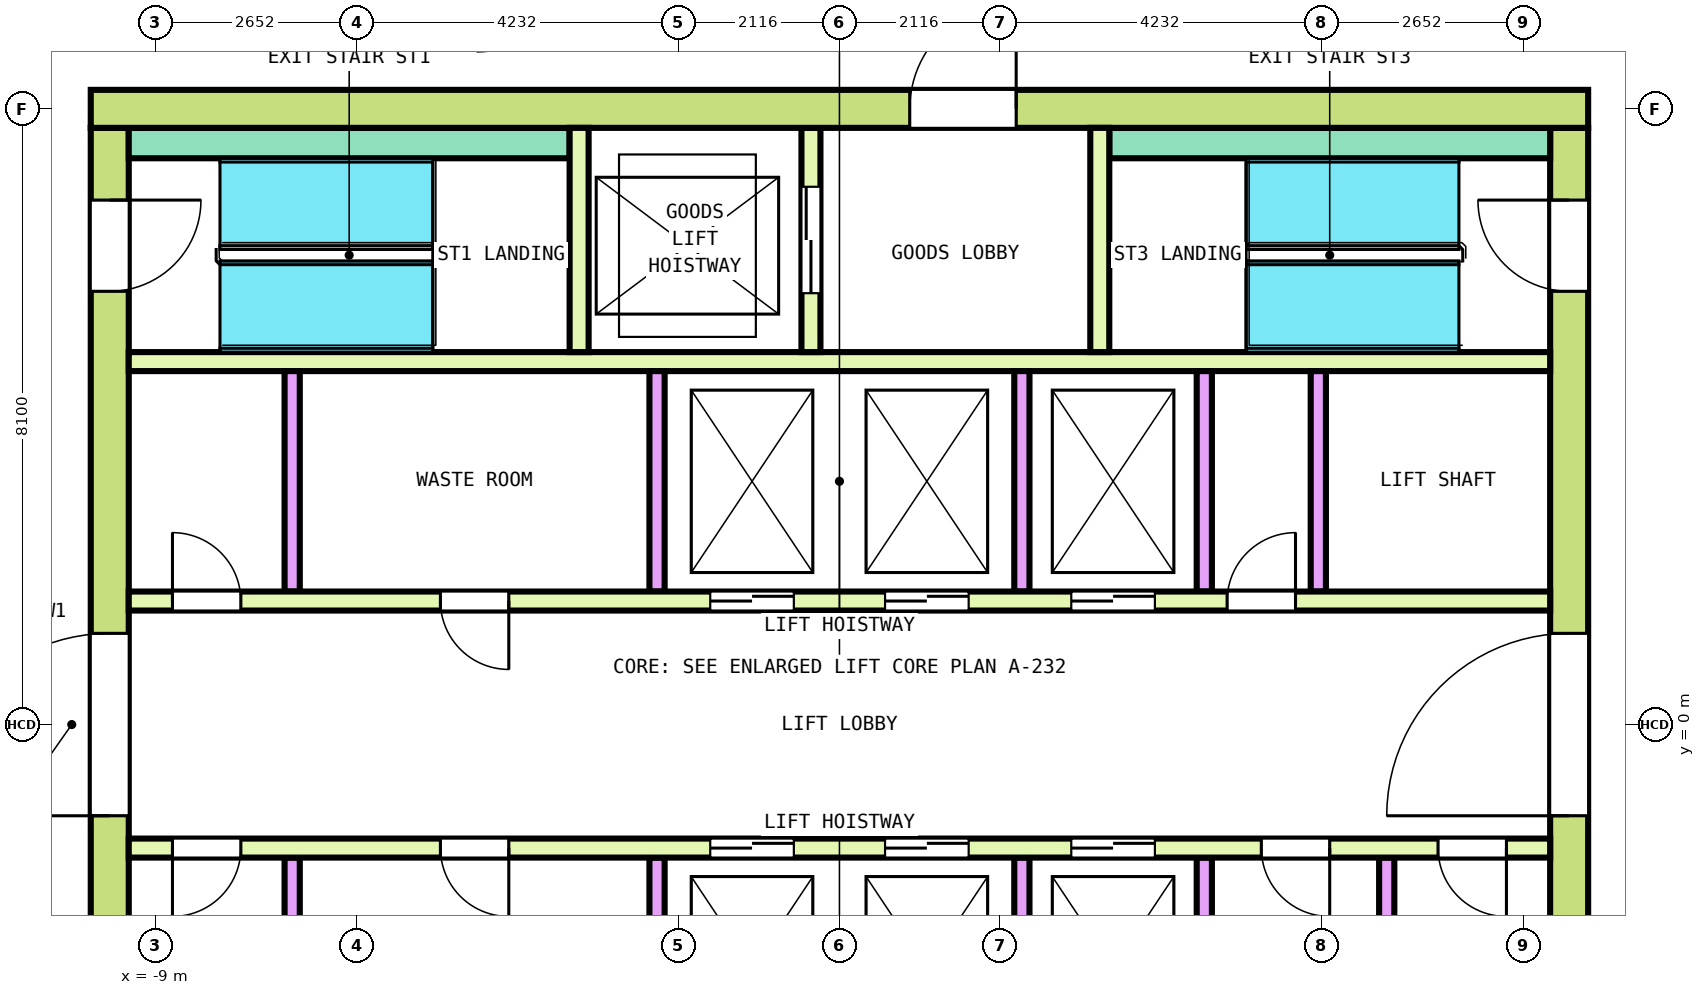
"""IFC4 building model, lengths in metres.
Left out: names, types, materials, properties, quantities, classifications, styles, units other than length and angle.
Written with IfcOpenShell. Run it as: python <this file> out.ifc"""

import sys

from ifc_helpers import new_model, si_unit, direction, frame, frame_2d, origin, place, context, subcontext, project, spatial, rectangle, extrude, element, fill, save


model = new_model("IFC4")
c1 = context("Model", 3, precision=1e-05, world=origin(), true_north=direction((0.0, 1.0)))
c2 = subcontext(c1, "Body", "Model", "MODEL_VIEW")
j1 = project(units=[si_unit("LENGTHUNIT", "METRE"), si_unit("PLANEANGLEUNIT", "RADIAN")], contexts=[c1])
p1 = place(None, origin())
s1 = spatial("IfcSite", under=j1, at=p1, CompositionType="ELEMENT")
p2 = place(p1, origin())
s2 = spatial("IfcBuilding", under=s1, at=p2, CompositionType="ELEMENT")
p3 = place(p2, frame((0.0, 0.0, 336.6)))
s3 = spatial("IfcBuildingStorey", under=s2, at=p3, CompositionType="ELEMENT", Elevation=336.6)
p4 = place(p3, frame((-9.85, 8.1, 0.0), z_axis=(0.0, 0.0, 1.0), x_axis=(1.0, 0.0, 0.0)))
e1 = element("IfcWall", 1, at=p4, inside=s3, PredefinedType="SHEAR", context=c2, shape_type="SweptSolid", body=[
    extrude(rectangle(XDim=19.7, YDim=0.5, at=frame_2d((9.85, 0.0))), origin(), (0.0, 0.0, 1.0), 3.7),
])
p5 = place(p4, frame((10.775, 0.0, 0.0)))
e2 = element("IfcOpeningElement", 2, at=p5, cuts=e1, PredefinedType="OPENING", context=c2, shape_type="SweptSolid", body=[
    extrude(rectangle(XDim=1.4, YDim=2.1, at=frame_2d((0.7, 1.05))), frame((0.0, 0.26, 0.0), z_axis=(0.0, -1.0, 0.0), x_axis=(1.0, 0.0, 0.0)), (0.0, 0.0, 1.0), 0.52),
])
p6 = place(p3, frame((-9.6, -7.85, 0.0), z_axis=(0.0, 0.0, 1.0), x_axis=(0.0, 1.0, 0.0)))
e3 = element("IfcWall", 3, at=p6, inside=s3, PredefinedType="SHEAR", context=c2, shape_type="SweptSolid", body=[
    extrude(rectangle(XDim=15.7, YDim=0.5, at=frame_2d((7.85, 0.0))), origin(), (0.0, 0.0, 1.0), 3.7),
])
p7 = place(p6, frame((6.65, 0.0, 0.0)))
e4 = element("IfcOpeningElement", 4, at=p7, cuts=e3, PredefinedType="OPENING", context=c2, shape_type="SweptSolid", body=[
    extrude(rectangle(XDim=2.4, YDim=2.1, at=frame_2d((1.2, 1.05))), frame((0.0, 0.26, 0.0), z_axis=(0.0, -1.0, 0.0), x_axis=(1.0, 0.0, 0.0)), (0.0, 0.0, 1.0), 0.52),
])
p8 = place(p6, frame((13.55, 0.0, 0.0)))
e5 = element("IfcOpeningElement", 5, at=p8, cuts=e3, PredefinedType="OPENING", context=c2, shape_type="SweptSolid", body=[
    extrude(rectangle(XDim=1.2, YDim=2.1, at=frame_2d((0.6, 1.05))), frame((0.0, 0.26, 0.0), z_axis=(0.0, -1.0, 0.0), x_axis=(1.0, 0.0, 0.0)), (0.0, 0.0, 1.0), 0.52),
])
p9 = place(p6, frame((0.95, 0.0, 0.0)))
e6 = element("IfcOpeningElement", 6, at=p9, cuts=e3, PredefinedType="OPENING", context=c2, shape_type="SweptSolid", body=[
    extrude(rectangle(XDim=1.2, YDim=2.1, at=frame_2d((0.6, 1.05))), frame((0.0, 0.26, 0.0), z_axis=(0.0, -1.0, 0.0), x_axis=(1.0, 0.0, 0.0)), (0.0, 0.0, 1.0), 0.52),
])
p10 = place(p3, frame((9.6, -7.85, 0.0), z_axis=(0.0, 0.0, 1.0), x_axis=(0.0, 1.0, 0.0)))
e7 = element("IfcWall", 7, at=p10, inside=s3, PredefinedType="SHEAR", context=c2, shape_type="SweptSolid", body=[
    extrude(rectangle(XDim=15.7, YDim=0.5, at=frame_2d((7.85, 0.0))), origin(), (0.0, 0.0, 1.0), 3.7),
])
p11 = place(p10, frame((6.65, 0.0, 0.0)))
e8 = element("IfcOpeningElement", 8, at=p11, cuts=e7, PredefinedType="OPENING", context=c2, shape_type="SweptSolid", body=[
    extrude(rectangle(XDim=2.4, YDim=2.1, at=frame_2d((1.2, 1.05))), frame((0.0, 0.26, 0.0), z_axis=(0.0, -1.0, 0.0), x_axis=(1.0, 0.0, 0.0)), (0.0, 0.0, 1.0), 0.52),
])
p12 = place(p10, frame((13.55, 0.0, 0.0)))
e9 = element("IfcOpeningElement", 9, at=p12, cuts=e7, PredefinedType="OPENING", context=c2, shape_type="SweptSolid", body=[
    extrude(rectangle(XDim=1.2, YDim=2.1, at=frame_2d((0.6, 1.05))), frame((0.0, 0.26, 0.0), z_axis=(0.0, -1.0, 0.0), x_axis=(1.0, 0.0, 0.0)), (0.0, 0.0, 1.0), 0.52),
])
p13 = place(p10, frame((1.05, 0.0, 0.0)))
e10 = element("IfcOpeningElement", 10, at=p13, cuts=e7, PredefinedType="OPENING", context=c2, shape_type="SweptSolid", body=[
    extrude(rectangle(XDim=1.0, YDim=2.1, at=frame_2d((0.5, 1.05))), frame((0.0, 0.26, 0.0), z_axis=(0.0, -1.0, 0.0), x_axis=(1.0, 0.0, 0.0)), (0.0, 0.0, 1.0), 0.52),
])
p14 = place(p3, frame((-9.35, 1.625, 0.0), z_axis=(0.0, 0.0, 1.0), x_axis=(1.0, 0.0, 0.0)))
e11 = element("IfcWall", 11, at=p14, inside=s3, PredefinedType="SOLIDWALL", context=c2, shape_type="SweptSolid", body=[
    extrude(rectangle(XDim=18.7, YDim=0.25, at=frame_2d((9.35, 0.0))), origin(), (0.0, 0.0, 1.0), 3.7),
])
p15 = place(p14, frame((7.65, 0.0, 0.0)))
e12 = element("IfcOpeningElement", 12, at=p15, cuts=e11, PredefinedType="OPENING", context=c2, shape_type="SweptSolid", body=[
    extrude(rectangle(XDim=1.1, YDim=2.1, at=frame_2d((0.55, 1.05))), frame((0.0, 0.135, 0.0), z_axis=(0.0, -1.0, 0.0), x_axis=(1.0, 0.0, 0.0)), (0.0, 0.0, 1.0), 0.27),
])
p16 = place(p14, frame((9.95, 0.0, 0.0)))
e13 = element("IfcOpeningElement", 13, at=p16, cuts=e11, PredefinedType="OPENING", context=c2, shape_type="SweptSolid", body=[
    extrude(rectangle(XDim=1.1, YDim=2.1, at=frame_2d((0.55, 1.05))), frame((0.0, 0.135, 0.0), z_axis=(0.0, -1.0, 0.0), x_axis=(1.0, 0.0, 0.0)), (0.0, 0.0, 1.0), 0.27),
])
p17 = place(p14, frame((12.4, 0.0, 0.0)))
e14 = element("IfcOpeningElement", 14, at=p17, cuts=e11, PredefinedType="OPENING", context=c2, shape_type="SweptSolid", body=[
    extrude(rectangle(XDim=1.1, YDim=2.1, at=frame_2d((0.55, 1.05))), frame((0.0, 0.135, 0.0), z_axis=(0.0, -1.0, 0.0), x_axis=(1.0, 0.0, 0.0)), (0.0, 0.0, 1.0), 0.27),
])
p18 = place(p14, frame((0.575, 0.0, 0.0)))
e15 = element("IfcOpeningElement", 15, at=p18, cuts=e11, PredefinedType="OPENING", context=c2, shape_type="SweptSolid", body=[
    extrude(rectangle(XDim=0.9, YDim=2.1, at=frame_2d((0.45, 1.05))), frame((0.0, 0.135, 0.0), z_axis=(0.0, -1.0, 0.0), x_axis=(1.0, 0.0, 0.0)), (0.0, 0.0, 1.0), 0.27),
])
p19 = place(p14, frame((4.1, 0.0, 0.0)))
e16 = element("IfcOpeningElement", 16, at=p19, cuts=e11, PredefinedType="OPENING", context=c2, shape_type="SweptSolid", body=[
    extrude(rectangle(XDim=0.9, YDim=2.1, at=frame_2d((0.45, 1.05))), frame((0.0, 0.135, 0.0), z_axis=(0.0, -1.0, 0.0), x_axis=(1.0, 0.0, 0.0)), (0.0, 0.0, 1.0), 0.27),
])
p20 = place(p14, frame((14.45, 0.0, 0.0)))
e17 = element("IfcOpeningElement", 17, at=p20, cuts=e11, PredefinedType="OPENING", context=c2, shape_type="SweptSolid", body=[
    extrude(rectangle(XDim=0.9, YDim=2.1, at=frame_2d((0.45, 1.05))), frame((0.0, 0.135, 0.0), z_axis=(0.0, -1.0, 0.0), x_axis=(1.0, 0.0, 0.0)), (0.0, 0.0, 1.0), 0.27),
])
p21 = place(p3, frame((-9.35, 4.775, 0.0), z_axis=(0.0, 0.0, 1.0), x_axis=(1.0, 0.0, 0.0)))
e18 = element("IfcWall", 18, at=p21, inside=s3, PredefinedType="SOLIDWALL", context=c2, shape_type="SweptSolid", body=[
    extrude(rectangle(XDim=18.7, YDim=0.25, at=frame_2d((9.35, 0.0))), origin(), (0.0, 0.0, 1.0), 3.7),
])
for number, where, z_axis, x_axis in (
    (19, (-7.2, 1.75, 0.0), (0.0, 0.0, 1.0), (0.0, 1.0, 0.0)),
    (20, (-2.4, 1.75, 0.0), (0.0, 0.0, 1.0), (0.0, 1.0, 0.0)),
    (21, (2.4, 1.75, 0.0), (0.0, 0.0, 1.0), (0.0, 1.0, 0.0)),
    (22, (4.8, 1.75, 0.0), (0.0, 0.0, 1.0), (0.0, 1.0, 0.0)),
    (23, (6.3, 1.75, 0.0), (0.0, 0.0, 1.0), (0.0, 1.0, 0.0)),
):
    element("IfcWall", number, at=place(p3, frame(where, z_axis=z_axis, x_axis=x_axis)), inside=s3, PredefinedType="SOLIDWALL", context=c2, shape_type="SweptSolid", body=[
        extrude(rectangle(XDim=2.9, YDim=0.2, at=frame_2d((1.45, 0.0))), origin(), (0.0, 0.0, 1.0), 3.7),
    ])
p22 = place(p3, frame((-9.35, -1.625, 0.0), z_axis=(0.0, 0.0, 1.0), x_axis=(1.0, 0.0, 0.0)))
e24 = element("IfcWall", 24, at=p22, inside=s3, PredefinedType="SOLIDWALL", context=c2, shape_type="SweptSolid", body=[
    extrude(rectangle(XDim=18.7, YDim=0.25, at=frame_2d((9.35, 0.0))), origin(), (0.0, 0.0, 1.0), 3.7),
])
p23 = place(p22, frame((7.65, 0.0, 0.0)))
e25 = element("IfcOpeningElement", 25, at=p23, cuts=e24, PredefinedType="OPENING", context=c2, shape_type="SweptSolid", body=[
    extrude(rectangle(XDim=1.1, YDim=2.1, at=frame_2d((0.55, 1.05))), frame((0.0, 0.135, 0.0), z_axis=(0.0, -1.0, 0.0), x_axis=(1.0, 0.0, 0.0)), (0.0, 0.0, 1.0), 0.27),
])
p24 = place(p22, frame((9.95, 0.0, 0.0)))
e26 = element("IfcOpeningElement", 26, at=p24, cuts=e24, PredefinedType="OPENING", context=c2, shape_type="SweptSolid", body=[
    extrude(rectangle(XDim=1.1, YDim=2.1, at=frame_2d((0.55, 1.05))), frame((0.0, 0.135, 0.0), z_axis=(0.0, -1.0, 0.0), x_axis=(1.0, 0.0, 0.0)), (0.0, 0.0, 1.0), 0.27),
])
p25 = place(p22, frame((12.4, 0.0, 0.0)))
e27 = element("IfcOpeningElement", 27, at=p25, cuts=e24, PredefinedType="OPENING", context=c2, shape_type="SweptSolid", body=[
    extrude(rectangle(XDim=1.1, YDim=2.1, at=frame_2d((0.55, 1.05))), frame((0.0, 0.135, 0.0), z_axis=(0.0, -1.0, 0.0), x_axis=(1.0, 0.0, 0.0)), (0.0, 0.0, 1.0), 0.27),
])
p26 = place(p22, frame((0.575, 0.0, 0.0)))
e28 = element("IfcOpeningElement", 28, at=p26, cuts=e24, PredefinedType="OPENING", context=c2, shape_type="SweptSolid", body=[
    extrude(rectangle(XDim=0.9, YDim=2.1, at=frame_2d((0.45, 1.05))), frame((0.0, 0.135, 0.0), z_axis=(0.0, -1.0, 0.0), x_axis=(1.0, 0.0, 0.0)), (0.0, 0.0, 1.0), 0.27),
])
p27 = place(p22, frame((4.1, 0.0, 0.0)))
e29 = element("IfcOpeningElement", 29, at=p27, cuts=e24, PredefinedType="OPENING", context=c2, shape_type="SweptSolid", body=[
    extrude(rectangle(XDim=0.9, YDim=2.1, at=frame_2d((0.45, 1.05))), frame((0.0, 0.135, 0.0), z_axis=(0.0, -1.0, 0.0), x_axis=(1.0, 0.0, 0.0)), (0.0, 0.0, 1.0), 0.27),
])
p28 = place(p22, frame((14.9, 0.0, 0.0)))
e30 = element("IfcOpeningElement", 30, at=p28, cuts=e24, PredefinedType="OPENING", context=c2, shape_type="SweptSolid", body=[
    extrude(rectangle(XDim=0.9, YDim=2.1, at=frame_2d((0.45, 1.05))), frame((0.0, 0.135, 0.0), z_axis=(0.0, -1.0, 0.0), x_axis=(1.0, 0.0, 0.0)), (0.0, 0.0, 1.0), 0.27),
])
p29 = place(p22, frame((17.225, 0.0, 0.0)))
e31 = element("IfcOpeningElement", 31, at=p29, cuts=e24, PredefinedType="OPENING", context=c2, shape_type="SweptSolid", body=[
    extrude(rectangle(XDim=0.9, YDim=2.1, at=frame_2d((0.45, 1.05))), frame((0.0, 0.135, 0.0), z_axis=(0.0, -1.0, 0.0), x_axis=(1.0, 0.0, 0.0)), (0.0, 0.0, 1.0), 0.27),
])
for number, where, z_axis, x_axis in (
    (32, (-7.2, -4.65, 0.0), (0.0, 0.0, 1.0), (0.0, 1.0, 0.0)),
    (33, (-2.4, -4.65, 0.0), (0.0, 0.0, 1.0), (0.0, 1.0, 0.0)),
    (34, (2.4, -4.65, 0.0), (0.0, 0.0, 1.0), (0.0, 1.0, 0.0)),
    (35, (4.8, -4.65, 0.0), (0.0, 0.0, 1.0), (0.0, 1.0, 0.0)),
    (36, (7.2, -4.65, 0.0), (0.0, 0.0, 1.0), (0.0, 1.0, 0.0)),
):
    element("IfcWall", number, at=place(p3, frame(where, z_axis=z_axis, x_axis=x_axis)), inside=s3, PredefinedType="SOLIDWALL", context=c2, shape_type="SweptSolid", body=[
        extrude(rectangle(XDim=2.9, YDim=0.2, at=frame_2d((1.45, 0.0))), origin(), (0.0, 0.0, 1.0), 3.7),
    ])
for number, where, z_axis, x_axis in (
    (37, (-9.35, 7.65, 0.0), (0.0, 0.0, 1.0), (1.0, 0.0, 0.0)),
    (38, (3.55, 7.65, 0.0), (0.0, 0.0, 1.0), (1.0, 0.0, 0.0)),
):
    element("IfcWall", number, at=place(p3, frame(where, z_axis=z_axis, x_axis=x_axis)), inside=s3, PredefinedType="SOLIDWALL", context=c2, shape_type="SweptSolid", body=[
        extrude(rectangle(XDim=5.8, YDim=0.4, at=frame_2d((2.9, 0.0))), origin(), (0.0, 0.0, 1.0), 3.7),
    ])
p30 = place(p3, frame((-3.425, 4.9, 0.0), z_axis=(0.0, 0.0, 1.0), x_axis=(0.0, 1.0, 0.0)))
e39 = element("IfcWall", 39, at=p30, inside=s3, PredefinedType="SOLIDWALL", context=c2, shape_type="SweptSolid", body=[
    extrude(rectangle(XDim=2.95, YDim=0.25, at=frame_2d((1.475, 0.0))), origin(), (0.0, 0.0, 1.0), 3.7),
])
p31 = place(p3, frame((-0.375, 4.9, 0.0), z_axis=(0.0, 0.0, 1.0), x_axis=(0.0, 1.0, 0.0)))
e40 = element("IfcWall", 40, at=p31, inside=s3, PredefinedType="SOLIDWALL", context=c2, shape_type="SweptSolid", body=[
    extrude(rectangle(XDim=2.95, YDim=0.25, at=frame_2d((1.475, 0.0))), origin(), (0.0, 0.0, 1.0), 3.7),
])
p32 = place(p31, frame((0.775, 0.0, 0.0)))
e41 = element("IfcOpeningElement", 41, at=p32, cuts=e40, PredefinedType="OPENING", context=c2, shape_type="SweptSolid", body=[
    extrude(rectangle(XDim=1.4, YDim=2.1, at=frame_2d((0.7, 1.05))), frame((0.0, 0.135, 0.0), z_axis=(0.0, -1.0, 0.0), x_axis=(1.0, 0.0, 0.0)), (0.0, 0.0, 1.0), 0.27),
])
p33 = place(p3, frame((3.425, 4.9, 0.0), z_axis=(0.0, 0.0, 1.0), x_axis=(0.0, 1.0, 0.0)))
e42 = element("IfcWall", 42, at=p33, inside=s3, PredefinedType="SOLIDWALL", context=c2, shape_type="SweptSolid", body=[
    extrude(rectangle(XDim=2.95, YDim=0.25, at=frame_2d((1.475, 0.0))), origin(), (0.0, 0.0, 1.0), 3.7),
])
p34 = place(p15, origin())
e43 = element("IfcDoor", 43, at=p34, inside=s3, OperationType="DOUBLE_DOOR_SLIDING", PredefinedType="DOOR", context=c2, shape_type="SweptSolid", body=[
    extrude(rectangle(XDim=1.1, YDim=2.1, at=frame_2d((0.55, 1.05))), frame((0.0, 0.075, 0.0), z_axis=(0.0, -1.0, 0.0), x_axis=(1.0, 0.0, 0.0)), (0.0, 0.0, 1.0), 0.15),
])
fill(e12, e43)
p35 = place(p16, origin())
e44 = element("IfcDoor", 44, at=p35, inside=s3, OperationType="DOUBLE_DOOR_SLIDING", PredefinedType="DOOR", context=c2, shape_type="SweptSolid", body=[
    extrude(rectangle(XDim=1.1, YDim=2.1, at=frame_2d((0.55, 1.05))), frame((0.0, 0.075, 0.0), z_axis=(0.0, -1.0, 0.0), x_axis=(1.0, 0.0, 0.0)), (0.0, 0.0, 1.0), 0.15),
])
fill(e13, e44)
p36 = place(p17, origin())
e45 = element("IfcDoor", 45, at=p36, inside=s3, OperationType="DOUBLE_DOOR_SLIDING", PredefinedType="DOOR", context=c2, shape_type="SweptSolid", body=[
    extrude(rectangle(XDim=1.1, YDim=2.1, at=frame_2d((0.55, 1.05))), frame((0.0, 0.075, 0.0), z_axis=(0.0, -1.0, 0.0), x_axis=(1.0, 0.0, 0.0)), (0.0, 0.0, 1.0), 0.15),
])
fill(e14, e45)
p37 = place(p23, origin())
e46 = element("IfcDoor", 46, at=p37, inside=s3, OperationType="DOUBLE_DOOR_SLIDING", PredefinedType="DOOR", context=c2, shape_type="SweptSolid", body=[
    extrude(rectangle(XDim=1.1, YDim=2.1, at=frame_2d((0.55, 1.05))), frame((0.0, 0.075, 0.0), z_axis=(0.0, -1.0, 0.0), x_axis=(1.0, 0.0, 0.0)), (0.0, 0.0, 1.0), 0.15),
])
fill(e25, e46)
p38 = place(p24, origin())
e47 = element("IfcDoor", 47, at=p38, inside=s3, OperationType="DOUBLE_DOOR_SLIDING", PredefinedType="DOOR", context=c2, shape_type="SweptSolid", body=[
    extrude(rectangle(XDim=1.1, YDim=2.1, at=frame_2d((0.55, 1.05))), frame((0.0, 0.075, 0.0), z_axis=(0.0, -1.0, 0.0), x_axis=(1.0, 0.0, 0.0)), (0.0, 0.0, 1.0), 0.15),
])
fill(e26, e47)
p39 = place(p25, origin())
e48 = element("IfcDoor", 48, at=p39, inside=s3, OperationType="DOUBLE_DOOR_SLIDING", PredefinedType="DOOR", context=c2, shape_type="SweptSolid", body=[
    extrude(rectangle(XDim=1.1, YDim=2.1, at=frame_2d((0.55, 1.05))), frame((0.0, 0.075, 0.0), z_axis=(0.0, -1.0, 0.0), x_axis=(1.0, 0.0, 0.0)), (0.0, 0.0, 1.0), 0.15),
])
fill(e27, e48)
p40 = place(p32, origin())
e49 = element("IfcDoor", 49, at=p40, inside=s3, OperationType="DOUBLE_DOOR_SLIDING", PredefinedType="DOOR", context=c2, shape_type="SweptSolid", body=[
    extrude(rectangle(XDim=1.4, YDim=2.1, at=frame_2d((0.7, 1.05))), frame((0.0, 0.075, 0.0), z_axis=(0.0, -1.0, 0.0), x_axis=(1.0, 0.0, 0.0)), (0.0, 0.0, 1.0), 0.15),
])
fill(e41, e49)
p41 = place(p7, origin())
e50 = element("IfcDoor", 50, at=p41, inside=s3, OperationType="DOUBLE_DOOR_SINGLE_SWING", PredefinedType="DOOR", context=c2, shape_type="SweptSolid", body=[
    extrude(rectangle(XDim=2.4, YDim=2.1, at=frame_2d((1.2, 1.05))), frame((0.0, 0.2, 0.0), z_axis=(0.0, -1.0, 0.0), x_axis=(1.0, 0.0, 0.0)), (0.0, 0.0, 1.0), 0.4),
])
fill(e4, e50)
p42 = place(p11, origin())
e51 = element("IfcDoor", 51, at=p42, inside=s3, OperationType="DOUBLE_DOOR_SINGLE_SWING", PredefinedType="DOOR", context=c2, shape_type="SweptSolid", body=[
    extrude(rectangle(XDim=2.4, YDim=2.1, at=frame_2d((1.2, 1.05))), frame((0.0, 0.2, 0.0), z_axis=(0.0, -1.0, 0.0), x_axis=(1.0, 0.0, 0.0)), (0.0, 0.0, 1.0), 0.4),
])
fill(e8, e51)
p43 = place(p8, origin())
e52 = element("IfcDoor", 52, at=p43, inside=s3, OperationType="SINGLE_SWING_RIGHT", PredefinedType="DOOR", context=c2, shape_type="SweptSolid", body=[
    extrude(rectangle(XDim=1.2, YDim=2.1, at=frame_2d((0.6, 1.05))), frame((0.0, 0.2, 0.0), z_axis=(0.0, -1.0, 0.0), x_axis=(1.0, 0.0, 0.0)), (0.0, 0.0, 1.0), 0.4),
])
fill(e5, e52)
p44 = place(p12, origin())
e53 = element("IfcDoor", 53, at=p44, inside=s3, OperationType="SINGLE_SWING_RIGHT", PredefinedType="DOOR", context=c2, shape_type="SweptSolid", body=[
    extrude(rectangle(XDim=1.2, YDim=2.1, at=frame_2d((0.6, 1.05))), frame((0.0, 0.2, 0.0), z_axis=(0.0, -1.0, 0.0), x_axis=(1.0, 0.0, 0.0)), (0.0, 0.0, 1.0), 0.4),
])
fill(e9, e53)
p45 = place(p5, origin())
e54 = element("IfcDoor", 54, at=p45, inside=s3, OperationType="DOUBLE_DOOR_SINGLE_SWING", PredefinedType="DOOR", context=c2, shape_type="SweptSolid", body=[
    extrude(rectangle(XDim=1.4, YDim=2.1, at=frame_2d((0.7, 1.05))), frame((0.0, 0.2, 0.0), z_axis=(0.0, -1.0, 0.0), x_axis=(1.0, 0.0, 0.0)), (0.0, 0.0, 1.0), 0.4),
])
fill(e2, e54)
p46 = place(p18, origin())
e55 = element("IfcDoor", 55, at=p46, inside=s3, OperationType="SINGLE_SWING_RIGHT", PredefinedType="DOOR", context=c2, shape_type="SweptSolid", body=[
    extrude(rectangle(XDim=0.9, YDim=2.1, at=frame_2d((0.45, 1.05))), frame((0.0, 0.075, 0.0), z_axis=(0.0, -1.0, 0.0), x_axis=(1.0, 0.0, 0.0)), (0.0, 0.0, 1.0), 0.15),
])
fill(e15, e55)
p47 = place(p19, origin())
e56 = element("IfcDoor", 56, at=p47, inside=s3, OperationType="SINGLE_SWING_LEFT", PredefinedType="DOOR", context=c2, shape_type="SweptSolid", body=[
    extrude(rectangle(XDim=0.9, YDim=2.1, at=frame_2d((0.45, 1.05))), frame((0.0, 0.075, 0.0), z_axis=(0.0, -1.0, 0.0), x_axis=(1.0, 0.0, 0.0)), (0.0, 0.0, 1.0), 0.15),
])
fill(e16, e56)
p48 = place(p20, origin())
e57 = element("IfcDoor", 57, at=p48, inside=s3, OperationType="SINGLE_SWING_RIGHT", PredefinedType="DOOR", context=c2, shape_type="SweptSolid", body=[
    extrude(rectangle(XDim=0.9, YDim=2.1, at=frame_2d((0.45, 1.05))), frame((0.0, 0.075, 0.0), z_axis=(0.0, -1.0, 0.0), x_axis=(1.0, 0.0, 0.0)), (0.0, 0.0, 1.0), 0.15),
])
fill(e17, e57)
p49 = place(p26, origin())
e58 = element("IfcDoor", 58, at=p49, inside=s3, OperationType="SINGLE_SWING_LEFT", PredefinedType="DOOR", context=c2, shape_type="SweptSolid", body=[
    extrude(rectangle(XDim=0.9, YDim=2.1, at=frame_2d((0.45, 1.05))), frame((0.0, 0.075, 0.0), z_axis=(0.0, -1.0, 0.0), x_axis=(1.0, 0.0, 0.0)), (0.0, 0.0, 1.0), 0.15),
])
fill(e28, e58)
p50 = place(p27, origin())
e59 = element("IfcDoor", 59, at=p50, inside=s3, OperationType="SINGLE_SWING_RIGHT", PredefinedType="DOOR", context=c2, shape_type="SweptSolid", body=[
    extrude(rectangle(XDim=0.9, YDim=2.1, at=frame_2d((0.45, 1.05))), frame((0.0, 0.075, 0.0), z_axis=(0.0, -1.0, 0.0), x_axis=(1.0, 0.0, 0.0)), (0.0, 0.0, 1.0), 0.15),
])
fill(e29, e59)
p51 = place(p28, origin())
e60 = element("IfcDoor", 60, at=p51, inside=s3, OperationType="SINGLE_SWING_LEFT", PredefinedType="DOOR", context=c2, shape_type="SweptSolid", body=[
    extrude(rectangle(XDim=0.9, YDim=2.1, at=frame_2d((0.45, 1.05))), frame((0.0, 0.075, 0.0), z_axis=(0.0, -1.0, 0.0), x_axis=(1.0, 0.0, 0.0)), (0.0, 0.0, 1.0), 0.15),
])
fill(e30, e60)
p52 = place(p29, origin())
e61 = element("IfcDoor", 61, at=p52, inside=s3, OperationType="SINGLE_SWING_RIGHT", PredefinedType="DOOR", context=c2, shape_type="SweptSolid", body=[
    extrude(rectangle(XDim=0.9, YDim=2.1, at=frame_2d((0.45, 1.05))), frame((0.0, 0.075, 0.0), z_axis=(0.0, -1.0, 0.0), x_axis=(1.0, 0.0, 0.0)), (0.0, 0.0, 1.0), 0.15),
])
fill(e31, e61)
save(model, sys.argv[1])
